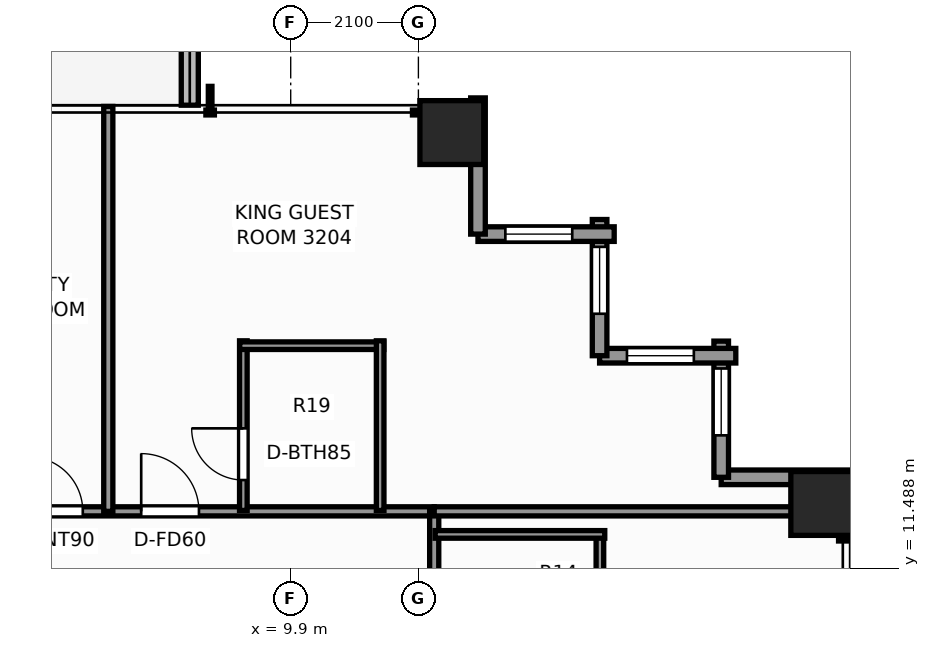
"""IFC4 building model, lengths in metres.
Left out: names, types, materials, properties, quantities, classifications, styles, units other than length and angle.
Written with IfcOpenShell. Run it as: python <this file> out.ifc"""

import sys

from ifc_helpers import new_model, si_unit, direction, frame, frame_2d, origin, origin_2d, place, context, subcontext, project, spatial, rectangle, extrude, element, fill, save


model = new_model("IFC4")
c1 = context("Model", 3, precision=1e-05, world=origin(), true_north=direction((0.0, 1.0)))
c2 = subcontext(c1, "Body", "Model", "MODEL_VIEW")
j1 = project(units=[si_unit("LENGTHUNIT", "METRE"), si_unit("PLANEANGLEUNIT", "RADIAN")], contexts=[c1])
p1 = place(None, origin())
s1 = spatial("IfcSite", under=j1, at=p1, CompositionType="ELEMENT")
p2 = place(p1, origin())
s2 = spatial("IfcBuilding", under=s1, at=p2, CompositionType="ELEMENT")
p3 = place(p2, frame((0.0, 0.0, 111.8)))
s3 = spatial("IfcBuildingStorey", under=s2, at=p3, CompositionType="ELEMENT", Elevation=111.8)
for number, where, z_axis, x_axis in (
    (1, (12.55, 18.65, 0.0), (0.0, 0.0, 1.0), (1.0, 0.0, 0.0)),
    (2, (18.65, 12.55, 0.0), (0.0, 0.0, 1.0), (1.0, 0.0, 0.0)),
):
    element("IfcColumn", number, at=place(p3, frame(where, z_axis=z_axis, x_axis=x_axis)), inside=s3, PredefinedType="COLUMN", context=c2, shape_type="SweptSolid", body=[
        extrude(rectangle(XDim=1.05, YDim=1.05, at=origin_2d()), origin(), (0.0, 0.0, 1.0), 3.3),
    ])
p4 = place(p3, frame((8.24, 19.1, -0.04), z_axis=(0.0, 0.0, 1.0), x_axis=(0.0, 1.0, 0.0)))
e3 = element("IfcWall", 3, at=p4, inside=s3, PredefinedType="PARAPET", context=c2, shape_type="SweptSolid", body=[
    extrude(rectangle(XDim=3.42, YDim=0.28, at=frame_2d((1.71, 0.0))), origin(), (0.0, 0.0, 1.0), 0.42),
])
p5 = place(p3, frame((16.98, 12.98, 0.0), z_axis=(0.0, 0.0, 1.0), x_axis=(1.0, 0.0, 0.0)))
e4 = element("IfcWall", 4, at=p5, inside=s3, PredefinedType="STANDARD", context=c2, shape_type="SweptSolid", body=[
    extrude(rectangle(XDim=2.24, YDim=0.24, at=frame_2d((1.12, 0.0))), origin(), (0.0, 0.0, 1.0), 2.459),
])
p6 = place(p3, frame((16.98, 15.22, 0.0), z_axis=(0.0, 0.0, 1.0), x_axis=(0.0, -1.0, 0.0)))
e5 = element("IfcWall", 5, at=p6, inside=s3, PredefinedType="STANDARD", context=c2, shape_type="SweptSolid", body=[
    extrude(rectangle(XDim=2.24, YDim=0.24, at=frame_2d((1.12, 0.0))), origin(), (0.0, 0.0, 1.0), 2.459),
])
p7 = place(p6, frame((0.45, 0.0, 0.65)))
e6 = element("IfcOpeningElement", 6, at=p7, cuts=e5, PredefinedType="OPENING", context=c2, shape_type="SweptSolid", body=[
    extrude(rectangle(XDim=1.1, YDim=1.45, at=frame_2d((0.55, 0.725))), frame((0.0, 0.13, 0.0), z_axis=(0.0, -1.0, 0.0), x_axis=(1.0, 0.0, 0.0)), (0.0, 0.0, 1.0), 0.26),
])
p8 = place(p3, frame((14.98, 14.98, 0.0), z_axis=(0.0, 0.0, 1.0), x_axis=(1.0, 0.0, 0.0)))
e7 = element("IfcWall", 7, at=p8, inside=s3, PredefinedType="STANDARD", context=c2, shape_type="SweptSolid", body=[
    extrude(rectangle(XDim=2.24, YDim=0.24, at=frame_2d((1.12, 0.0))), origin(), (0.0, 0.0, 1.0), 2.459),
])
p9 = place(p8, frame((0.45, 0.0, 0.65)))
e8 = element("IfcOpeningElement", 8, at=p9, cuts=e7, PredefinedType="OPENING", context=c2, shape_type="SweptSolid", body=[
    extrude(rectangle(XDim=1.1, YDim=1.45, at=frame_2d((0.55, 0.725))), frame((0.0, 0.13, 0.0), z_axis=(0.0, -1.0, 0.0), x_axis=(1.0, 0.0, 0.0)), (0.0, 0.0, 1.0), 0.26),
])
p10 = place(p3, frame((14.98, 17.22, 0.0), z_axis=(0.0, 0.0, 1.0), x_axis=(0.0, -1.0, 0.0)))
e9 = element("IfcWall", 9, at=p10, inside=s3, PredefinedType="STANDARD", context=c2, shape_type="SweptSolid", body=[
    extrude(rectangle(XDim=2.24, YDim=0.24, at=frame_2d((1.12, 0.0))), origin(), (0.0, 0.0, 1.0), 2.459),
])
p11 = place(p10, frame((0.45, 0.0, 0.65)))
e10 = element("IfcOpeningElement", 10, at=p11, cuts=e9, PredefinedType="OPENING", context=c2, shape_type="SweptSolid", body=[
    extrude(rectangle(XDim=1.1, YDim=1.45, at=frame_2d((0.55, 0.725))), frame((0.0, 0.13, 0.0), z_axis=(0.0, -1.0, 0.0), x_axis=(1.0, 0.0, 0.0)), (0.0, 0.0, 1.0), 0.26),
])
p12 = place(p3, frame((12.98, 16.98, 0.0), z_axis=(0.0, 0.0, 1.0), x_axis=(1.0, 0.0, 0.0)))
e11 = element("IfcWall", 11, at=p12, inside=s3, PredefinedType="STANDARD", context=c2, shape_type="SweptSolid", body=[
    extrude(rectangle(XDim=2.24, YDim=0.24, at=frame_2d((1.12, 0.0))), origin(), (0.0, 0.0, 1.0), 2.459),
])
p13 = place(p12, frame((0.45, 0.0, 0.65)))
e12 = element("IfcOpeningElement", 12, at=p13, cuts=e11, PredefinedType="OPENING", context=c2, shape_type="SweptSolid", body=[
    extrude(rectangle(XDim=1.1, YDim=1.45, at=frame_2d((0.55, 0.725))), frame((0.0, 0.13, 0.0), z_axis=(0.0, -1.0, 0.0), x_axis=(1.0, 0.0, 0.0)), (0.0, 0.0, 1.0), 0.26),
])
p14 = place(p3, frame((12.98, 19.22, 0.0), z_axis=(0.0, 0.0, 1.0), x_axis=(0.0, -1.0, 0.0)))
e13 = element("IfcWall", 13, at=p14, inside=s3, PredefinedType="STANDARD", context=c2, shape_type="SweptSolid", body=[
    extrude(rectangle(XDim=2.24, YDim=0.24, at=frame_2d((1.12, 0.0))), origin(), (0.0, 0.0, 1.0), 2.459),
])
p15 = place(p3, frame((-12.42, 12.42, 0.0), z_axis=(0.0, 0.0, 1.0), x_axis=(1.0, 0.0, 0.0)))
e14 = element("IfcWall", 14, at=p15, inside=s3, PredefinedType="PARTITIONING", context=c2, shape_type="SweptSolid", body=[
    extrude(rectangle(XDim=24.68, YDim=0.15, at=frame_2d((12.34, 0.0))), origin(), (0.0, 0.0, 1.0), 2.292),
])
p16 = place(p15, frame((3.781, 0.0, 0.0)))
e15 = element("IfcOpeningElement", 15, at=p16, cuts=e14, PredefinedType="OPENING", context=c2, shape_type="SweptSolid", body=[
    extrude(rectangle(XDim=0.9, YDim=2.06, at=frame_2d((0.45, 1.03))), frame((0.0, 0.085, 0.0), z_axis=(0.0, -1.0, 0.0), x_axis=(1.0, 0.0, 0.0)), (0.0, 0.0, 1.0), 0.17),
])
p17 = place(p15, frame((8.773, 0.0, 0.0)))
e16 = element("IfcOpeningElement", 16, at=p17, cuts=e14, PredefinedType="OPENING", context=c2, shape_type="SweptSolid", body=[
    extrude(rectangle(XDim=0.9, YDim=2.06, at=frame_2d((0.45, 1.03))), frame((0.0, 0.085, 0.0), z_axis=(0.0, -1.0, 0.0), x_axis=(1.0, 0.0, 0.0)), (0.0, 0.0, 1.0), 0.17),
])
p18 = place(p15, frame((10.656, 0.0, 0.0)))
e17 = element("IfcOpeningElement", 17, at=p18, cuts=e14, PredefinedType="OPENING", context=c2, shape_type="SweptSolid", body=[
    extrude(rectangle(XDim=0.9, YDim=2.06, at=frame_2d((0.45, 1.03))), frame((0.0, 0.085, 0.0), z_axis=(0.0, -1.0, 0.0), x_axis=(1.0, 0.0, 0.0)), (0.0, 0.0, 1.0), 0.17),
])
p19 = place(p15, frame((13.773, 0.0, 0.0)))
e18 = element("IfcOpeningElement", 18, at=p19, cuts=e14, PredefinedType="OPENING", context=c2, shape_type="SweptSolid", body=[
    extrude(rectangle(XDim=0.95, YDim=2.06, at=frame_2d((0.475, 1.03))), frame((0.0, 0.085, 0.0), z_axis=(0.0, -1.0, 0.0), x_axis=(1.0, 0.0, 0.0)), (0.0, 0.0, 1.0), 0.17),
])
p20 = place(p15, frame((18.0, 0.0, 0.0)))
e19 = element("IfcOpeningElement", 19, at=p20, cuts=e14, PredefinedType="OPENING", context=c2, shape_type="SweptSolid", body=[
    extrude(rectangle(XDim=0.9, YDim=2.06, at=frame_2d((0.45, 1.03))), frame((0.0, 0.085, 0.0), z_axis=(0.0, -1.0, 0.0), x_axis=(1.0, 0.0, 0.0)), (0.0, 0.0, 1.0), 0.17),
])
p21 = place(p15, frame((19.861, 0.0, 0.0)))
e20 = element("IfcOpeningElement", 20, at=p21, cuts=e14, PredefinedType="OPENING", context=c2, shape_type="SweptSolid", body=[
    extrude(rectangle(XDim=0.95, YDim=2.06, at=frame_2d((0.475, 1.03))), frame((0.0, 0.085, 0.0), z_axis=(0.0, -1.0, 0.0), x_axis=(1.0, 0.0, 0.0)), (0.0, 0.0, 1.0), 0.17),
])
p22 = place(p3, frame((12.26, -12.42, 0.0), z_axis=(0.0, 0.0, 1.0), x_axis=(0.0, 1.0, 0.0)))
e21 = element("IfcWall", 21, at=p22, inside=s3, PredefinedType="PARTITIONING", context=c2, shape_type="SweptSolid", body=[
    extrude(rectangle(XDim=24.84, YDim=0.15, at=frame_2d((12.42, 0.0))), origin(), (0.0, 0.0, 1.0), 2.292),
])
p23 = place(p22, frame((3.373, 0.0, 0.0)))
e22 = element("IfcOpeningElement", 22, at=p23, cuts=e21, PredefinedType="OPENING", context=c2, shape_type="SweptSolid", body=[
    extrude(rectangle(XDim=0.95, YDim=2.06, at=frame_2d((0.475, 1.03))), frame((0.0, 0.085, 0.0), z_axis=(0.0, -1.0, 0.0), x_axis=(1.0, 0.0, 0.0)), (0.0, 0.0, 1.0), 0.17),
])
p24 = place(p22, frame((5.593, 0.0, 0.0)))
e23 = element("IfcOpeningElement", 23, at=p24, cuts=e21, PredefinedType="OPENING", context=c2, shape_type="SweptSolid", body=[
    extrude(rectangle(XDim=0.95, YDim=2.06, at=frame_2d((0.475, 1.03))), frame((0.0, 0.085, 0.0), z_axis=(0.0, -1.0, 0.0), x_axis=(1.0, 0.0, 0.0)), (0.0, 0.0, 1.0), 0.17),
])
p25 = place(p22, frame((13.981, 0.0, 0.0)))
e24 = element("IfcOpeningElement", 24, at=p25, cuts=e21, PredefinedType="OPENING", context=c2, shape_type="SweptSolid", body=[
    extrude(rectangle(XDim=0.95, YDim=2.06, at=frame_2d((0.475, 1.03))), frame((0.0, 0.085, 0.0), z_axis=(0.0, -1.0, 0.0), x_axis=(1.0, 0.0, 0.0)), (0.0, 0.0, 1.0), 0.17),
])
p26 = place(p22, frame((16.886, 0.0, 0.0)))
e25 = element("IfcOpeningElement", 25, at=p26, cuts=e21, PredefinedType="OPENING", context=c2, shape_type="SweptSolid", body=[
    extrude(rectangle(XDim=0.9, YDim=2.06, at=frame_2d((0.45, 1.03))), frame((0.0, 0.085, 0.0), z_axis=(0.0, -1.0, 0.0), x_axis=(1.0, 0.0, 0.0)), (0.0, 0.0, 1.0), 0.17),
])
p27 = place(p22, frame((20.0, 0.0, 0.0)))
e26 = element("IfcOpeningElement", 26, at=p27, cuts=e21, PredefinedType="OPENING", context=c2, shape_type="SweptSolid", body=[
    extrude(rectangle(XDim=0.95, YDim=2.06, at=frame_2d((0.475, 1.03))), frame((0.0, 0.085, 0.0), z_axis=(0.0, -1.0, 0.0), x_axis=(1.0, 0.0, 0.0)), (0.0, 0.0, 1.0), 0.17),
])
p28 = place(p3, frame((12.26, 12.42, 0.0), z_axis=(0.0, 0.0, 1.0), x_axis=(1.0, 0.0, 0.0)))
e27 = element("IfcWall", 27, at=p28, inside=s3, PredefinedType="PARTITIONING", context=c2, shape_type="SweptSolid", body=[
    extrude(rectangle(XDim=6.82, YDim=0.15, at=frame_2d((3.41, 0.0))), origin(), (0.0, 0.0, 1.0), 2.292),
])
p29 = place(p3, frame((6.9, 12.42, 0.0), z_axis=(0.0, 0.0, 1.0), x_axis=(0.0, 1.0, 0.0)))
e28 = element("IfcWall", 28, at=p29, inside=s3, PredefinedType="PARTITIONING", context=c2, shape_type="SweptSolid", body=[
    extrude(rectangle(XDim=6.66, YDim=0.15, at=frame_2d((3.33, 0.0))), origin(), (0.0, 0.0, 1.0), 2.449),
])
p30 = place(p3, frame((9.121, 12.435, 0.0), z_axis=(0.0, 0.0, 1.0), x_axis=(0.0, 1.0, 0.0)))
e29 = element("IfcWall", 29, at=p30, inside=s3, PredefinedType="PARTITIONING", context=c2, shape_type="SweptSolid", body=[
    extrude(rectangle(XDim=2.79, YDim=0.125, at=frame_2d((1.395, 0.0))), origin(), (0.0, 0.0, 1.0), 3.08),
])
p31 = place(p30, frame((0.5, 0.0, 0.0)))
e30 = element("IfcOpeningElement", 30, at=p31, cuts=e29, PredefinedType="OPENING", context=c2, shape_type="SweptSolid", body=[
    extrude(rectangle(XDim=0.85, YDim=2.03, at=frame_2d((0.425, 1.015))), frame((0.0, 0.073, 0.0), z_axis=(0.0, -1.0, 0.0), x_axis=(1.0, 0.0, 0.0)), (0.0, 0.0, 1.0), 0.145),
])
p32 = place(p3, frame((9.061, 15.145, 0.0), z_axis=(0.0, 0.0, 1.0), x_axis=(1.0, 0.0, 0.0)))
e31 = element("IfcWall", 31, at=p32, inside=s3, PredefinedType="PARTITIONING", context=c2, shape_type="SweptSolid", body=[
    extrude(rectangle(XDim=2.37, YDim=0.125, at=frame_2d((1.185, 0.0))), origin(), (0.0, 0.0, 1.0), 2.292),
])
p33 = place(p3, frame((11.371, 12.435, 0.0), z_axis=(0.0, 0.0, 1.0), x_axis=(0.0, 1.0, 0.0)))
e32 = element("IfcWall", 32, at=p33, inside=s3, PredefinedType="PARTITIONING", context=c2, shape_type="SweptSolid", body=[
    extrude(rectangle(XDim=2.79, YDim=0.125, at=frame_2d((1.395, 0.0))), origin(), (0.0, 0.0, 1.0), 2.292),
])
p34 = place(p3, frame((14.985, 9.731, 0.0), z_axis=(0.0, 0.0, 1.0), x_axis=(0.0, 1.0, 0.0)))
e33 = element("IfcWall", 33, at=p34, inside=s3, PredefinedType="PARTITIONING", context=c2, shape_type="SweptSolid", body=[
    extrude(rectangle(XDim=2.37, YDim=0.125, at=frame_2d((1.185, 0.0))), origin(), (0.0, 0.0, 1.0), 2.292),
])
p35 = place(p3, frame((12.275, 12.041, 0.0), z_axis=(0.0, 0.0, 1.0), x_axis=(1.0, 0.0, 0.0)))
e34 = element("IfcWall", 34, at=p35, inside=s3, PredefinedType="PARTITIONING", context=c2, shape_type="SweptSolid", body=[
    extrude(rectangle(XDim=2.79, YDim=0.125, at=frame_2d((1.395, 0.0))), origin(), (0.0, 0.0, 1.0), 3.08),
])
p36 = place(p7, origin())
e35 = element("IfcWindow", 35, at=p36, inside=s3, PartitioningType="SINGLE_PANEL", PredefinedType="WINDOW", context=c2, shape_type="SweptSolid", body=[
    extrude(rectangle(XDim=1.1, YDim=1.45, at=frame_2d((0.55, 0.725))), frame((0.0, 0.03, 0.0), z_axis=(0.0, -1.0, 0.0), x_axis=(1.0, 0.0, 0.0)), (0.0, 0.0, 1.0), 0.06),
])
fill(e6, e35)
p37 = place(p9, origin())
e36 = element("IfcWindow", 36, at=p37, inside=s3, PartitioningType="SINGLE_PANEL", PredefinedType="WINDOW", context=c2, shape_type="SweptSolid", body=[
    extrude(rectangle(XDim=1.1, YDim=1.45, at=frame_2d((0.55, 0.725))), frame((0.0, 0.03, 0.0), z_axis=(0.0, -1.0, 0.0), x_axis=(1.0, 0.0, 0.0)), (0.0, 0.0, 1.0), 0.06),
])
fill(e8, e36)
p38 = place(p11, origin())
e37 = element("IfcWindow", 37, at=p38, inside=s3, PartitioningType="SINGLE_PANEL", PredefinedType="WINDOW", context=c2, shape_type="SweptSolid", body=[
    extrude(rectangle(XDim=1.1, YDim=1.45, at=frame_2d((0.55, 0.725))), frame((0.0, 0.03, 0.0), z_axis=(0.0, -1.0, 0.0), x_axis=(1.0, 0.0, 0.0)), (0.0, 0.0, 1.0), 0.06),
])
fill(e10, e37)
p39 = place(p13, origin())
e38 = element("IfcWindow", 38, at=p39, inside=s3, PartitioningType="SINGLE_PANEL", PredefinedType="WINDOW", context=c2, shape_type="SweptSolid", body=[
    extrude(rectangle(XDim=1.1, YDim=1.45, at=frame_2d((0.55, 0.725))), frame((0.0, 0.03, 0.0), z_axis=(0.0, -1.0, 0.0), x_axis=(1.0, 0.0, 0.0)), (0.0, 0.0, 1.0), 0.06),
])
fill(e12, e38)
p40 = place(p20, origin())
e39 = element("IfcDoor", 39, at=p40, inside=s3, OperationType="SINGLE_SWING_LEFT", PredefinedType="DOOR", context=c2, shape_type="SweptSolid", body=[
    extrude(rectangle(XDim=0.9, YDim=2.06, at=frame_2d((0.45, 1.03))), frame((0.0, 0.025, 0.0), z_axis=(0.0, -1.0, 0.0), x_axis=(1.0, 0.0, 0.0)), (0.0, 0.0, 1.0), 0.05),
])
fill(e19, e39)
p41 = place(p31, origin())
e40 = element("IfcDoor", 40, at=p41, inside=s3, OperationType="SINGLE_SWING_RIGHT", PredefinedType="DOOR", context=c2, shape_type="SweptSolid", body=[
    extrude(rectangle(XDim=0.85, YDim=2.03, at=frame_2d((0.425, 1.015))), frame((0.0, 0.025, 0.0), z_axis=(0.0, -1.0, 0.0), x_axis=(1.0, 0.0, 0.0)), (0.0, 0.0, 1.0), 0.05),
])
fill(e30, e40)
p42 = place(p21, origin())
e41 = element("IfcDoor", 41, at=p42, inside=s3, OperationType="SINGLE_SWING_LEFT", PredefinedType="DOOR", context=c2, shape_type="SweptSolid", body=[
    extrude(rectangle(XDim=0.95, YDim=2.06, at=frame_2d((0.475, 1.03))), frame((0.0, 0.025, 0.0), z_axis=(0.0, -1.0, 0.0), x_axis=(1.0, 0.0, 0.0)), (0.0, 0.0, 1.0), 0.05),
])
fill(e20, e41)
save(model, sys.argv[1])
